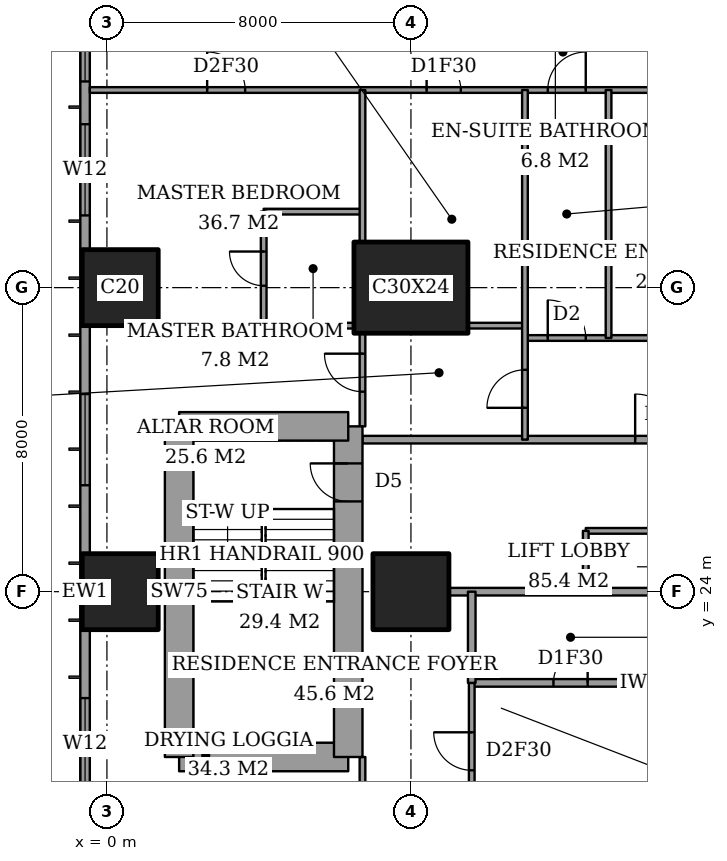
"""IFC4 building model, lengths in metres.
Left out: names, types, materials, properties, quantities, classifications, styles, units other than length and angle.
Written with IfcOpenShell. Run it as: python <this file> out.ifc"""

import sys

from ifc_helpers import new_model, si_unit, direction, frame, frame_2d, origin, origin_2d, place, context, subcontext, project, spatial, rectangle, extrude, element, fill, save


model = new_model("IFC4")
c1 = context("Model", 3, precision=1e-05, world=origin(), true_north=direction((0.0, 1.0)))
c2 = subcontext(c1, "Body", "Model", "MODEL_VIEW")
j1 = project(units=[si_unit("LENGTHUNIT", "METRE"), si_unit("PLANEANGLEUNIT", "RADIAN")], contexts=[c1])
p1 = place(None, origin())
s1 = spatial("IfcSite", under=j1, at=p1, CompositionType="ELEMENT")
p2 = place(p1, origin())
s2 = spatial("IfcBuilding", under=s1, at=p2, CompositionType="ELEMENT")
p3 = place(p2, frame((0.0, 0.0, 114.2)))
s3 = spatial("IfcBuildingStorey", under=s2, at=p3, CompositionType="ELEMENT", Elevation=114.2)
for number, where, z_axis, x_axis in (
    (1, (0.35, 24.0, 0.0), (0.0, 0.0, 1.0), (1.0, 0.0, 0.0)),
    (2, (0.35, 32.0, 0.0), (0.0, 0.0, 1.0), (1.0, 0.0, 0.0)),
    (3, (8.0, 24.0, 0.0), (0.0, 0.0, 1.0), (1.0, 0.0, 0.0)),
):
    element("IfcColumn", number, at=place(p3, frame(where, z_axis=z_axis, x_axis=x_axis)), inside=s3, PredefinedType="COLUMN", context=c2, shape_type="SweptSolid", body=[
        extrude(rectangle(XDim=2.0, YDim=2.0, at=origin_2d()), origin(), (0.0, 0.0, 1.0), 3.6),
    ])
p4 = place(p3, frame((8.0, 32.0, 0.0), z_axis=(0.0, 0.0, 1.0), x_axis=(1.0, 0.0, 0.0)))
e4 = element("IfcColumn", 4, at=p4, inside=s3, PredefinedType="COLUMN", context=c2, shape_type="SweptSolid", body=[
    extrude(rectangle(XDim=3.0, YDim=2.4, at=origin_2d()), origin(), (0.0, 0.0, 1.0), 3.6),
])
p5 = place(p3, frame((1.9, 19.65, 0.0), z_axis=(0.0, 0.0, 1.0), x_axis=(1.0, 0.0, 0.0)))
e5 = element("IfcWall", 5, at=p5, inside=s3, PredefinedType="SHEAR", context=c2, shape_type="SweptSolid", body=[
    extrude(rectangle(XDim=4.45, YDim=0.75, at=frame_2d((2.225, 0.0))), origin(), (0.0, 0.0, 1.0), 3.6),
])
p6 = place(p3, frame((6.35, 19.65, 0.0), z_axis=(0.0, 0.0, 1.0), x_axis=(0.0, 1.0, 0.0)))
e6 = element("IfcWall", 6, at=p6, inside=s3, PredefinedType="SHEAR", context=c2, shape_type="SweptSolid", body=[
    extrude(rectangle(XDim=8.7, YDim=0.75, at=frame_2d((4.35, 0.0))), origin(), (0.0, 0.0, 1.0), 3.6),
])
p7 = place(p6, frame((6.725, 0.0, 0.0)))
e7 = element("IfcOpeningElement", 7, at=p7, cuts=e6, PredefinedType="OPENING", context=c2, shape_type="SweptSolid", body=[
    extrude(rectangle(XDim=1.0, YDim=2.1, at=frame_2d((0.5, 1.05))), frame((0.0, 0.385, 0.0), z_axis=(0.0, -1.0, 0.0), x_axis=(1.0, 0.0, 0.0)), (0.0, 0.0, 1.0), 0.77),
])
p8 = place(p3, frame((6.35, 28.35, 0.0), z_axis=(0.0, 0.0, 1.0), x_axis=(-1.0, 0.0, 0.0)))
e8 = element("IfcWall", 8, at=p8, inside=s3, PredefinedType="SHEAR", context=c2, shape_type="SweptSolid", body=[
    extrude(rectangle(XDim=4.45, YDim=0.75, at=frame_2d((2.225, 0.0))), origin(), (0.0, 0.0, 1.0), 3.6),
])
p9 = place(p3, frame((1.9, 28.35, 0.0), z_axis=(0.0, 0.0, 1.0), x_axis=(0.0, -1.0, 0.0)))
e9 = element("IfcWall", 9, at=p9, inside=s3, PredefinedType="SHEAR", context=c2, shape_type="SweptSolid", body=[
    extrude(rectangle(XDim=8.7, YDim=0.75, at=frame_2d((4.35, 0.0))), origin(), (0.0, 0.0, 1.0), 3.6),
])
p10 = place(p3, frame((-0.575, 44.825, 0.0), z_axis=(0.0, 0.0, 1.0), x_axis=(0.0, -1.0, 0.0)))
e10 = element("IfcWall", 10, at=p10, inside=s3, PredefinedType="SOLIDWALL", context=c2, shape_type="SweptSolid", body=[
    extrude(rectangle(XDim=41.65, YDim=0.25, at=frame_2d((20.825, 0.0))), origin(), (0.0, 0.0, 1.0), 3.6),
])
p11 = place(p10, frame((0.775, 0.0, 0.4)))
e11 = element("IfcOpeningElement", 11, at=p11, cuts=e10, PredefinedType="OPENING", context=c2, shape_type="SweptSolid", body=[
    extrude(rectangle(XDim=2.4, YDim=2.2, at=frame_2d((1.2, 1.1))), frame((0.0, 0.135, 0.0), z_axis=(0.0, -1.0, 0.0), x_axis=(1.0, 0.0, 0.0)), (0.0, 0.0, 1.0), 0.27),
])
p12 = place(p10, frame((6.2, 0.0, 0.4)))
e12 = element("IfcOpeningElement", 12, at=p12, cuts=e10, PredefinedType="OPENING", context=c2, shape_type="SweptSolid", body=[
    extrude(rectangle(XDim=1.2, YDim=2.2, at=frame_2d((0.6, 1.1))), frame((0.0, 0.135, 0.0), z_axis=(0.0, -1.0, 0.0), x_axis=(1.0, 0.0, 0.0)), (0.0, 0.0, 1.0), 0.27),
])
p13 = place(p10, frame((8.525, 0.0, 0.4)))
e13 = element("IfcOpeningElement", 13, at=p13, cuts=e10, PredefinedType="OPENING", context=c2, shape_type="SweptSolid", body=[
    extrude(rectangle(XDim=2.4, YDim=2.2, at=frame_2d((1.2, 1.1))), frame((0.0, 0.135, 0.0), z_axis=(0.0, -1.0, 0.0), x_axis=(1.0, 0.0, 0.0)), (0.0, 0.0, 1.0), 0.27),
])
p14 = place(p10, frame((15.625, 0.0, 0.4)))
e14 = element("IfcOpeningElement", 14, at=p14, cuts=e10, PredefinedType="OPENING", context=c2, shape_type="SweptSolid", body=[
    extrude(rectangle(XDim=2.4, YDim=2.2, at=frame_2d((1.2, 1.1))), frame((0.0, 0.135, 0.0), z_axis=(0.0, -1.0, 0.0), x_axis=(1.0, 0.0, 0.0)), (0.0, 0.0, 1.0), 0.27),
])
p15 = place(p10, frame((23.625, 0.0, 0.4)))
e15 = element("IfcOpeningElement", 15, at=p15, cuts=e10, PredefinedType="OPENING", context=c2, shape_type="SweptSolid", body=[
    extrude(rectangle(XDim=2.4, YDim=2.2, at=frame_2d((1.2, 1.1))), frame((0.0, 0.135, 0.0), z_axis=(0.0, -1.0, 0.0), x_axis=(1.0, 0.0, 0.0)), (0.0, 0.0, 1.0), 0.27),
])
p16 = place(p10, frame((30.825, 0.0, 0.4)))
e16 = element("IfcOpeningElement", 16, at=p16, cuts=e10, PredefinedType="OPENING", context=c2, shape_type="SweptSolid", body=[
    extrude(rectangle(XDim=2.4, YDim=2.2, at=frame_2d((1.2, 1.1))), frame((0.0, 0.135, 0.0), z_axis=(0.0, -1.0, 0.0), x_axis=(1.0, 0.0, 0.0)), (0.0, 0.0, 1.0), 0.27),
])
p17 = place(p10, frame((34.5, 0.0, 0.4)))
e17 = element("IfcOpeningElement", 17, at=p17, cuts=e10, PredefinedType="OPENING", context=c2, shape_type="SweptSolid", body=[
    extrude(rectangle(XDim=1.2, YDim=2.2, at=frame_2d((0.6, 1.1))), frame((0.0, 0.135, 0.0), z_axis=(0.0, -1.0, 0.0), x_axis=(1.0, 0.0, 0.0)), (0.0, 0.0, 1.0), 0.27),
])
p18 = place(p10, frame((38.475, 0.0, 0.4)))
e18 = element("IfcOpeningElement", 18, at=p18, cuts=e10, PredefinedType="OPENING", context=c2, shape_type="SweptSolid", body=[
    extrude(rectangle(XDim=2.4, YDim=2.2, at=frame_2d((1.2, 1.1))), frame((0.0, 0.135, 0.0), z_axis=(0.0, -1.0, 0.0), x_axis=(1.0, 0.0, 0.0)), (0.0, 0.0, 1.0), 0.27),
])
p19 = place(p3, frame((9.6, 21.6, 0.0), z_axis=(0.0, 0.0, 1.0), x_axis=(1.0, 0.0, 0.0)))
e19 = element("IfcWall", 19, at=p19, inside=s3, PredefinedType="PARTITIONING", context=c2, shape_type="SweptSolid", body=[
    extrude(rectangle(XDim=5.2, YDim=0.2, at=frame_2d((2.6, 0.0))), origin(), (0.0, 0.0, 1.0), 3.35),
])
p20 = place(p19, frame((2.15, 0.0, 0.0)))
e20 = element("IfcOpeningElement", 20, at=p20, cuts=e19, PredefinedType="OPENING", context=c2, shape_type="SweptSolid", body=[
    extrude(rectangle(XDim=0.9, YDim=2.1, at=frame_2d((0.45, 1.05))), frame((0.0, 0.11, 0.0), z_axis=(0.0, -1.0, 0.0), x_axis=(1.0, 0.0, 0.0)), (0.0, 0.0, 1.0), 0.22),
])
p21 = place(p3, frame((9.0, 24.0, 0.0), z_axis=(0.0, 0.0, 1.0), x_axis=(1.0, 0.0, 0.0)))
e21 = element("IfcWall", 21, at=p21, inside=s3, PredefinedType="PARTITIONING", context=c2, shape_type="SweptSolid", body=[
    extrude(rectangle(XDim=6.0, YDim=0.2, at=frame_2d((3.0, 0.0))), origin(), (0.0, 0.0, 1.0), 3.35),
])
p22 = place(p3, frame((12.6, 25.6, 0.0), z_axis=(0.0, 0.0, 1.0), x_axis=(1.0, 0.0, 0.0)))
e22 = element("IfcWall", 22, at=p22, inside=s3, PredefinedType="PARTITIONING", context=c2, shape_type="SweptSolid", body=[
    extrude(rectangle(XDim=4.8, YDim=0.15, at=frame_2d((2.4, 0.0))), origin(), (0.0, 0.0, 1.0), 3.35),
])
p23 = place(p22, frame((1.65, 0.0, 0.0)))
e23 = element("IfcOpeningElement", 23, at=p23, cuts=e22, PredefinedType="OPENING", context=c2, shape_type="SweptSolid", body=[
    extrude(rectangle(XDim=0.9, YDim=2.1, at=frame_2d((0.45, 1.05))), frame((0.0, 0.085, 0.0), z_axis=(0.0, -1.0, 0.0), x_axis=(1.0, 0.0, 0.0)), (0.0, 0.0, 1.0), 0.17),
])
p24 = place(p3, frame((6.725, 28.0, 0.0), z_axis=(0.0, 0.0, 1.0), x_axis=(1.0, 0.0, 0.0)))
e24 = element("IfcWall", 24, at=p24, inside=s3, PredefinedType="PARTITIONING", context=c2, shape_type="SweptSolid", body=[
    extrude(rectangle(XDim=17.275, YDim=0.2, at=frame_2d((8.637, 0.0))), origin(), (0.0, 0.0, 1.0), 3.35),
])
p25 = place(p24, frame((7.175, 0.0, 0.0)))
e25 = element("IfcOpeningElement", 25, at=p25, cuts=e24, PredefinedType="OPENING", context=c2, shape_type="SweptSolid", body=[
    extrude(rectangle(XDim=1.2, YDim=2.4, at=frame_2d((0.6, 1.2))), frame((0.0, 0.11, 0.0), z_axis=(0.0, -1.0, 0.0), x_axis=(1.0, 0.0, 0.0)), (0.0, 0.0, 1.0), 0.22),
])
p26 = place(p3, frame((11.0, 30.675, 0.0), z_axis=(0.0, 0.0, 1.0), x_axis=(1.0, 0.0, 0.0)))
e26 = element("IfcWall", 26, at=p26, inside=s3, PredefinedType="PARTITIONING", context=c2, shape_type="SweptSolid", body=[
    extrude(rectangle(XDim=3.4, YDim=0.15, at=frame_2d((1.7, 0.0))), origin(), (0.0, 0.0, 1.0), 3.35),
])
p27 = place(p26, frame((0.6, 0.0, 0.0)))
e27 = element("IfcOpeningElement", 27, at=p27, cuts=e26, PredefinedType="OPENING", context=c2, shape_type="SweptSolid", body=[
    extrude(rectangle(XDim=1.0, YDim=2.1, at=frame_2d((0.5, 1.05))), frame((0.0, 0.085, 0.0), z_axis=(0.0, -1.0, 0.0), x_axis=(1.0, 0.0, 0.0)), (0.0, 0.0, 1.0), 0.17),
])
p28 = place(p3, frame((1.35, 31.0, 0.0), z_axis=(0.0, 0.0, 1.0), x_axis=(1.0, 0.0, 0.0)))
e28 = element("IfcWall", 28, at=p28, inside=s3, PredefinedType="PARTITIONING", context=c2, shape_type="SweptSolid", body=[
    extrude(rectangle(XDim=5.15, YDim=0.15, at=frame_2d((2.575, 0.0))), origin(), (0.0, 0.0, 1.0), 3.35),
])
p29 = place(p3, frame((9.5, 31.0, 0.0), z_axis=(0.0, 0.0, 1.0), x_axis=(1.0, 0.0, 0.0)))
e29 = element("IfcWall", 29, at=p29, inside=s3, PredefinedType="PARTITIONING", context=c2, shape_type="SweptSolid", body=[
    extrude(rectangle(XDim=1.5, YDim=0.15, at=frame_2d((0.75, 0.0))), origin(), (0.0, 0.0, 1.0), 3.35),
])
p30 = place(p3, frame((4.125, 34.0, 0.0), z_axis=(0.0, 0.0, 1.0), x_axis=(1.0, 0.0, 0.0)))
e30 = element("IfcWall", 30, at=p30, inside=s3, PredefinedType="PARTITIONING", context=c2, shape_type="SweptSolid", body=[
    extrude(rectangle(XDim=2.6, YDim=0.15, at=frame_2d((1.3, 0.0))), origin(), (0.0, 0.0, 1.0), 3.35),
])
p31 = place(p3, frame((-0.45, 37.2, 0.0), z_axis=(0.0, 0.0, 1.0), x_axis=(1.0, 0.0, 0.0)))
e31 = element("IfcWall", 31, at=p31, inside=s3, PredefinedType="PARTITIONING", context=c2, shape_type="SweptSolid", body=[
    extrude(rectangle(XDim=25.011, YDim=0.15, at=frame_2d((12.505, 0.0))), origin(), (0.0, 0.0, 1.0), 3.35),
])
p32 = place(p31, frame((12.05, 0.0, 0.0)))
e32 = element("IfcOpeningElement", 32, at=p32, cuts=e31, PredefinedType="OPENING", context=c2, shape_type="SweptSolid", body=[
    extrude(rectangle(XDim=1.0, YDim=2.1, at=frame_2d((0.5, 1.05))), frame((0.0, 0.085, 0.0), z_axis=(0.0, -1.0, 0.0), x_axis=(1.0, 0.0, 0.0)), (0.0, 0.0, 1.0), 0.17),
])
p33 = place(p31, frame((3.087, 0.0, 0.0)))
e33 = element("IfcOpeningElement", 33, at=p33, cuts=e31, PredefinedType="OPENING", context=c2, shape_type="SweptSolid", body=[
    extrude(rectangle(XDim=1.0, YDim=2.1, at=frame_2d((0.5, 1.05))), frame((0.0, 0.085, 0.0), z_axis=(0.0, -1.0, 0.0), x_axis=(1.0, 0.0, 0.0)), (0.0, 0.0, 1.0), 0.17),
])
p34 = place(p31, frame((8.863, 0.0, 0.0)))
e34 = element("IfcOpeningElement", 34, at=p34, cuts=e31, PredefinedType="OPENING", context=c2, shape_type="SweptSolid", body=[
    extrude(rectangle(XDim=0.9, YDim=2.1, at=frame_2d((0.45, 1.05))), frame((0.0, 0.085, 0.0), z_axis=(0.0, -1.0, 0.0), x_axis=(1.0, 0.0, 0.0)), (0.0, 0.0, 1.0), 0.17),
])
p35 = place(p31, frame((15.55, 0.0, 0.0)))
e35 = element("IfcOpeningElement", 35, at=p35, cuts=e31, PredefinedType="OPENING", context=c2, shape_type="SweptSolid", body=[
    extrude(rectangle(XDim=1.0, YDim=2.1, at=frame_2d((0.5, 1.05))), frame((0.0, 0.085, 0.0), z_axis=(0.0, -1.0, 0.0), x_axis=(1.0, 0.0, 0.0)), (0.0, 0.0, 1.0), 0.17),
])
p36 = place(p31, frame((21.175, 0.0, 0.0)))
e36 = element("IfcOpeningElement", 36, at=p36, cuts=e31, PredefinedType="OPENING", context=c2, shape_type="SweptSolid", body=[
    extrude(rectangle(XDim=1.0, YDim=2.1, at=frame_2d((0.5, 1.05))), frame((0.0, 0.085, 0.0), z_axis=(0.0, -1.0, 0.0), x_axis=(1.0, 0.0, 0.0)), (0.0, 0.0, 1.0), 0.17),
])
p37 = place(p3, frame((4.125, 31.0, 0.0), z_axis=(0.0, 0.0, 1.0), x_axis=(0.0, 1.0, 0.0)))
e37 = element("IfcWall", 37, at=p37, inside=s3, PredefinedType="PARTITIONING", context=c2, shape_type="SweptSolid", body=[
    extrude(rectangle(XDim=3.0, YDim=0.15, at=frame_2d((1.5, 0.0))), origin(), (0.0, 0.0, 1.0), 3.35),
])
p38 = place(p37, frame((1.05, 0.0, 0.0)))
e38 = element("IfcOpeningElement", 38, at=p38, cuts=e37, PredefinedType="OPENING", context=c2, shape_type="SweptSolid", body=[
    extrude(rectangle(XDim=0.9, YDim=2.1, at=frame_2d((0.45, 1.05))), frame((0.0, 0.085, 0.0), z_axis=(0.0, -1.0, 0.0), x_axis=(1.0, 0.0, 0.0)), (0.0, 0.0, 1.0), 0.17),
])
p39 = place(p3, frame((6.725, 17.2, 0.0), z_axis=(0.0, 0.0, 1.0), x_axis=(0.0, 1.0, 0.0)))
e39 = element("IfcWall", 39, at=p39, inside=s3, PredefinedType="PARTITIONING", context=c2, shape_type="SweptSolid", body=[
    extrude(rectangle(XDim=2.45, YDim=0.15, at=frame_2d((1.225, 0.0))), origin(), (0.0, 0.0, 1.0), 3.35),
])
p40 = place(p39, frame((0.587, 0.0, 0.0)))
e40 = element("IfcOpeningElement", 40, at=p40, cuts=e39, PredefinedType="OPENING", context=c2, shape_type="SweptSolid", body=[
    extrude(rectangle(XDim=0.9, YDim=2.1, at=frame_2d((0.45, 1.05))), frame((0.0, 0.085, 0.0), z_axis=(0.0, -1.0, 0.0), x_axis=(1.0, 0.0, 0.0)), (0.0, 0.0, 1.0), 0.17),
])
p41 = place(p3, frame((6.725, 28.35, 0.0), z_axis=(0.0, 0.0, 1.0), x_axis=(0.0, 1.0, 0.0)))
e41 = element("IfcWall", 41, at=p41, inside=s3, PredefinedType="PARTITIONING", context=c2, shape_type="SweptSolid", body=[
    extrude(rectangle(XDim=2.45, YDim=0.15, at=frame_2d((1.225, 0.0))), origin(), (0.0, 0.0, 1.0), 3.35),
])
p42 = place(p41, frame((0.913, 0.0, 0.0)))
e42 = element("IfcOpeningElement", 42, at=p42, cuts=e41, PredefinedType="OPENING", context=c2, shape_type="SweptSolid", body=[
    extrude(rectangle(XDim=1.0, YDim=2.1, at=frame_2d((0.5, 1.05))), frame((0.0, 0.085, 0.0), z_axis=(0.0, -1.0, 0.0), x_axis=(1.0, 0.0, 0.0)), (0.0, 0.0, 1.0), 0.17),
])
p43 = place(p3, frame((6.725, 33.2, 0.0), z_axis=(0.0, 0.0, 1.0), x_axis=(0.0, 1.0, 0.0)))
e43 = element("IfcWall", 43, at=p43, inside=s3, PredefinedType="PARTITIONING", context=c2, shape_type="SweptSolid", body=[
    extrude(rectangle(XDim=4.0, YDim=0.15, at=frame_2d((2.0, 0.0))), origin(), (0.0, 0.0, 1.0), 3.35),
])
p44 = place(p3, frame((9.6, 21.6, 0.0), z_axis=(0.0, 0.0, 1.0), x_axis=(0.0, 1.0, 0.0)))
e44 = element("IfcWall", 44, at=p44, inside=s3, PredefinedType="PARTITIONING", context=c2, shape_type="SweptSolid", body=[
    extrude(rectangle(XDim=2.4, YDim=0.2, at=frame_2d((1.2, 0.0))), origin(), (0.0, 0.0, 1.0), 3.35),
])
p45 = place(p3, frame((9.6, 10.6, 0.0), z_axis=(0.0, 0.0, 1.0), x_axis=(0.0, 1.0, 0.0)))
e45 = element("IfcWall", 45, at=p45, inside=s3, PredefinedType="PARTITIONING", context=c2, shape_type="SweptSolid", body=[
    extrude(rectangle(XDim=11.0, YDim=0.15, at=frame_2d((5.5, 0.0))), origin(), (0.0, 0.0, 1.0), 3.35),
])
p46 = place(p45, frame((8.7, 0.0, 0.0)))
e46 = element("IfcOpeningElement", 46, at=p46, cuts=e45, PredefinedType="OPENING", context=c2, shape_type="SweptSolid", body=[
    extrude(rectangle(XDim=1.0, YDim=2.1, at=frame_2d((0.5, 1.05))), frame((0.0, 0.085, 0.0), z_axis=(0.0, -1.0, 0.0), x_axis=(1.0, 0.0, 0.0)), (0.0, 0.0, 1.0), 0.17),
])
p47 = place(p3, frame((11.0, 28.0, 0.0), z_axis=(0.0, 0.0, 1.0), x_axis=(0.0, 1.0, 0.0)))
e47 = element("IfcWall", 47, at=p47, inside=s3, PredefinedType="PARTITIONING", context=c2, shape_type="SweptSolid", body=[
    extrude(rectangle(XDim=9.2, YDim=0.15, at=frame_2d((4.6, 0.0))), origin(), (0.0, 0.0, 1.0), 3.35),
])
p48 = place(p47, frame((0.837, 0.0, 0.0)))
e48 = element("IfcOpeningElement", 48, at=p48, cuts=e47, PredefinedType="OPENING", context=c2, shape_type="SweptSolid", body=[
    extrude(rectangle(XDim=1.0, YDim=2.1, at=frame_2d((0.5, 1.05))), frame((0.0, 0.085, 0.0), z_axis=(0.0, -1.0, 0.0), x_axis=(1.0, 0.0, 0.0)), (0.0, 0.0, 1.0), 0.17),
])
p49 = place(p3, frame((12.6, 24.0, 0.0), z_axis=(0.0, 0.0, 1.0), x_axis=(0.0, 1.0, 0.0)))
e49 = element("IfcWall", 49, at=p49, inside=s3, PredefinedType="PARTITIONING", context=c2, shape_type="SweptSolid", body=[
    extrude(rectangle(XDim=1.6, YDim=0.15, at=frame_2d((0.8, 0.0))), origin(), (0.0, 0.0, 1.0), 3.35),
])
p50 = place(p3, frame((13.2, 30.675, 0.0), z_axis=(0.0, 0.0, 1.0), x_axis=(0.0, 1.0, 0.0)))
e50 = element("IfcWall", 50, at=p50, inside=s3, PredefinedType="PARTITIONING", context=c2, shape_type="SweptSolid", body=[
    extrude(rectangle(XDim=6.525, YDim=0.15, at=frame_2d((3.262, 0.0))), origin(), (0.0, 0.0, 1.0), 3.35),
])
p51 = place(p12, origin())
e51 = element("IfcWindow", 51, at=p51, inside=s3, PartitioningType="SINGLE_PANEL", PredefinedType="WINDOW", context=c2, shape_type="SweptSolid", body=[
    extrude(rectangle(XDim=1.2, YDim=2.2, at=frame_2d((0.6, 1.1))), frame((0.0, 0.03, 0.0), z_axis=(0.0, -1.0, 0.0), x_axis=(1.0, 0.0, 0.0)), (0.0, 0.0, 1.0), 0.06),
])
fill(e12, e51)
p52 = place(p13, origin())
e52 = element("IfcWindow", 52, at=p52, inside=s3, PartitioningType="SINGLE_PANEL", PredefinedType="WINDOW", context=c2, shape_type="SweptSolid", body=[
    extrude(rectangle(XDim=2.4, YDim=2.2, at=frame_2d((1.2, 1.1))), frame((0.0, 0.03, 0.0), z_axis=(0.0, -1.0, 0.0), x_axis=(1.0, 0.0, 0.0)), (0.0, 0.0, 1.0), 0.06),
])
fill(e13, e52)
p53 = place(p14, origin())
e53 = element("IfcWindow", 53, at=p53, inside=s3, PartitioningType="SINGLE_PANEL", PredefinedType="WINDOW", context=c2, shape_type="SweptSolid", body=[
    extrude(rectangle(XDim=2.4, YDim=2.2, at=frame_2d((1.2, 1.1))), frame((0.0, 0.03, 0.0), z_axis=(0.0, -1.0, 0.0), x_axis=(1.0, 0.0, 0.0)), (0.0, 0.0, 1.0), 0.06),
])
fill(e14, e53)
p54 = place(p15, origin())
e54 = element("IfcWindow", 54, at=p54, inside=s3, PartitioningType="SINGLE_PANEL", PredefinedType="WINDOW", context=c2, shape_type="SweptSolid", body=[
    extrude(rectangle(XDim=2.4, YDim=2.2, at=frame_2d((1.2, 1.1))), frame((0.0, 0.03, 0.0), z_axis=(0.0, -1.0, 0.0), x_axis=(1.0, 0.0, 0.0)), (0.0, 0.0, 1.0), 0.06),
])
fill(e15, e54)
p55 = place(p46, origin())
e55 = element("IfcDoor", 55, at=p55, inside=s3, OperationType="SINGLE_SWING_LEFT", PredefinedType="DOOR", context=c2, shape_type="SweptSolid", body=[
    extrude(rectangle(XDim=1.0, YDim=2.1, at=frame_2d((0.5, 1.05))), frame((0.0, 0.025, 0.0), z_axis=(0.0, -1.0, 0.0), x_axis=(1.0, 0.0, 0.0)), (0.0, 0.0, 1.0), 0.05),
])
fill(e46, e55)
p56 = place(p20, origin())
e56 = element("IfcDoor", 56, at=p56, inside=s3, OperationType="SINGLE_SWING_LEFT", PredefinedType="DOOR", context=c2, shape_type="SweptSolid", body=[
    extrude(rectangle(XDim=0.9, YDim=2.1, at=frame_2d((0.45, 1.05))), frame((0.0, 0.025, 0.0), z_axis=(0.0, -1.0, 0.0), x_axis=(1.0, 0.0, 0.0)), (0.0, 0.0, 1.0), 0.05),
])
fill(e20, e56)
p57 = place(p32, origin())
e57 = element("IfcDoor", 57, at=p57, inside=s3, OperationType="SINGLE_SWING_LEFT", PredefinedType="DOOR", context=c2, shape_type="SweptSolid", body=[
    extrude(rectangle(XDim=1.0, YDim=2.1, at=frame_2d((0.5, 1.05))), frame((0.0, 0.025, 0.0), z_axis=(0.0, -1.0, 0.0), x_axis=(1.0, 0.0, 0.0)), (0.0, 0.0, 1.0), 0.05),
])
fill(e32, e57)
p58 = place(p38, origin())
e58 = element("IfcDoor", 58, at=p58, inside=s3, OperationType="SINGLE_SWING_LEFT", PredefinedType="DOOR", context=c2, shape_type="SweptSolid", body=[
    extrude(rectangle(XDim=0.9, YDim=2.1, at=frame_2d((0.45, 1.05))), frame((0.0, 0.025, 0.0), z_axis=(0.0, -1.0, 0.0), x_axis=(1.0, 0.0, 0.0)), (0.0, 0.0, 1.0), 0.05),
])
fill(e38, e58)
p59 = place(p33, origin())
e59 = element("IfcDoor", 59, at=p59, inside=s3, OperationType="SINGLE_SWING_RIGHT", PredefinedType="DOOR", context=c2, shape_type="SweptSolid", body=[
    extrude(rectangle(XDim=1.0, YDim=2.1, at=frame_2d((0.5, 1.05))), frame((0.0, 0.025, 0.0), z_axis=(0.0, -1.0, 0.0), x_axis=(1.0, 0.0, 0.0)), (0.0, 0.0, 1.0), 0.05),
])
fill(e33, e59)
p60 = place(p42, origin())
e60 = element("IfcDoor", 60, at=p60, inside=s3, OperationType="SINGLE_SWING_LEFT", PredefinedType="DOOR", context=c2, shape_type="SweptSolid", body=[
    extrude(rectangle(XDim=1.0, YDim=2.1, at=frame_2d((0.5, 1.05))), frame((0.0, 0.025, 0.0), z_axis=(0.0, -1.0, 0.0), x_axis=(1.0, 0.0, 0.0)), (0.0, 0.0, 1.0), 0.05),
])
fill(e42, e60)
p61 = place(p34, origin())
e61 = element("IfcDoor", 61, at=p61, inside=s3, OperationType="SINGLE_SWING_RIGHT", PredefinedType="DOOR", context=c2, shape_type="SweptSolid", body=[
    extrude(rectangle(XDim=0.9, YDim=2.1, at=frame_2d((0.45, 1.05))), frame((0.0, 0.025, 0.0), z_axis=(0.0, -1.0, 0.0), x_axis=(1.0, 0.0, 0.0)), (0.0, 0.0, 1.0), 0.05),
])
fill(e34, e61)
p62 = place(p48, origin())
e62 = element("IfcDoor", 62, at=p62, inside=s3, OperationType="SINGLE_SWING_RIGHT", PredefinedType="DOOR", context=c2, shape_type="SweptSolid", body=[
    extrude(rectangle(XDim=1.0, YDim=2.1, at=frame_2d((0.5, 1.05))), frame((0.0, 0.025, 0.0), z_axis=(0.0, -1.0, 0.0), x_axis=(1.0, 0.0, 0.0)), (0.0, 0.0, 1.0), 0.05),
])
fill(e48, e62)
p63 = place(p25, origin())
e63 = element("IfcDoor", 63, at=p63, inside=s3, OperationType="SINGLE_SWING_RIGHT", PredefinedType="DOOR", context=c2, shape_type="SweptSolid", body=[
    extrude(rectangle(XDim=1.2, YDim=2.4, at=frame_2d((0.6, 1.2))), frame((0.0, 0.025, 0.0), z_axis=(0.0, -1.0, 0.0), x_axis=(1.0, 0.0, 0.0)), (0.0, 0.0, 1.0), 0.05),
])
fill(e25, e63)
p64 = place(p27, origin())
e64 = element("IfcDoor", 64, at=p64, inside=s3, OperationType="SINGLE_SWING_RIGHT", PredefinedType="DOOR", context=c2, shape_type="SweptSolid", body=[
    extrude(rectangle(XDim=1.0, YDim=2.1, at=frame_2d((0.5, 1.05))), frame((0.0, 0.025, 0.0), z_axis=(0.0, -1.0, 0.0), x_axis=(1.0, 0.0, 0.0)), (0.0, 0.0, 1.0), 0.05),
])
fill(e27, e64)
p65 = place(p7, origin())
e65 = element("IfcDoor", 65, at=p65, inside=s3, OperationType="SINGLE_SWING_LEFT", PredefinedType="DOOR", context=c2, shape_type="SweptSolid", body=[
    extrude(rectangle(XDim=1.0, YDim=2.1, at=frame_2d((0.5, 1.05))), frame((0.0, 0.025, 0.0), z_axis=(0.0, -1.0, 0.0), x_axis=(1.0, 0.0, 0.0)), (0.0, 0.0, 1.0), 0.05),
])
fill(e7, e65)
save(model, sys.argv[1])
